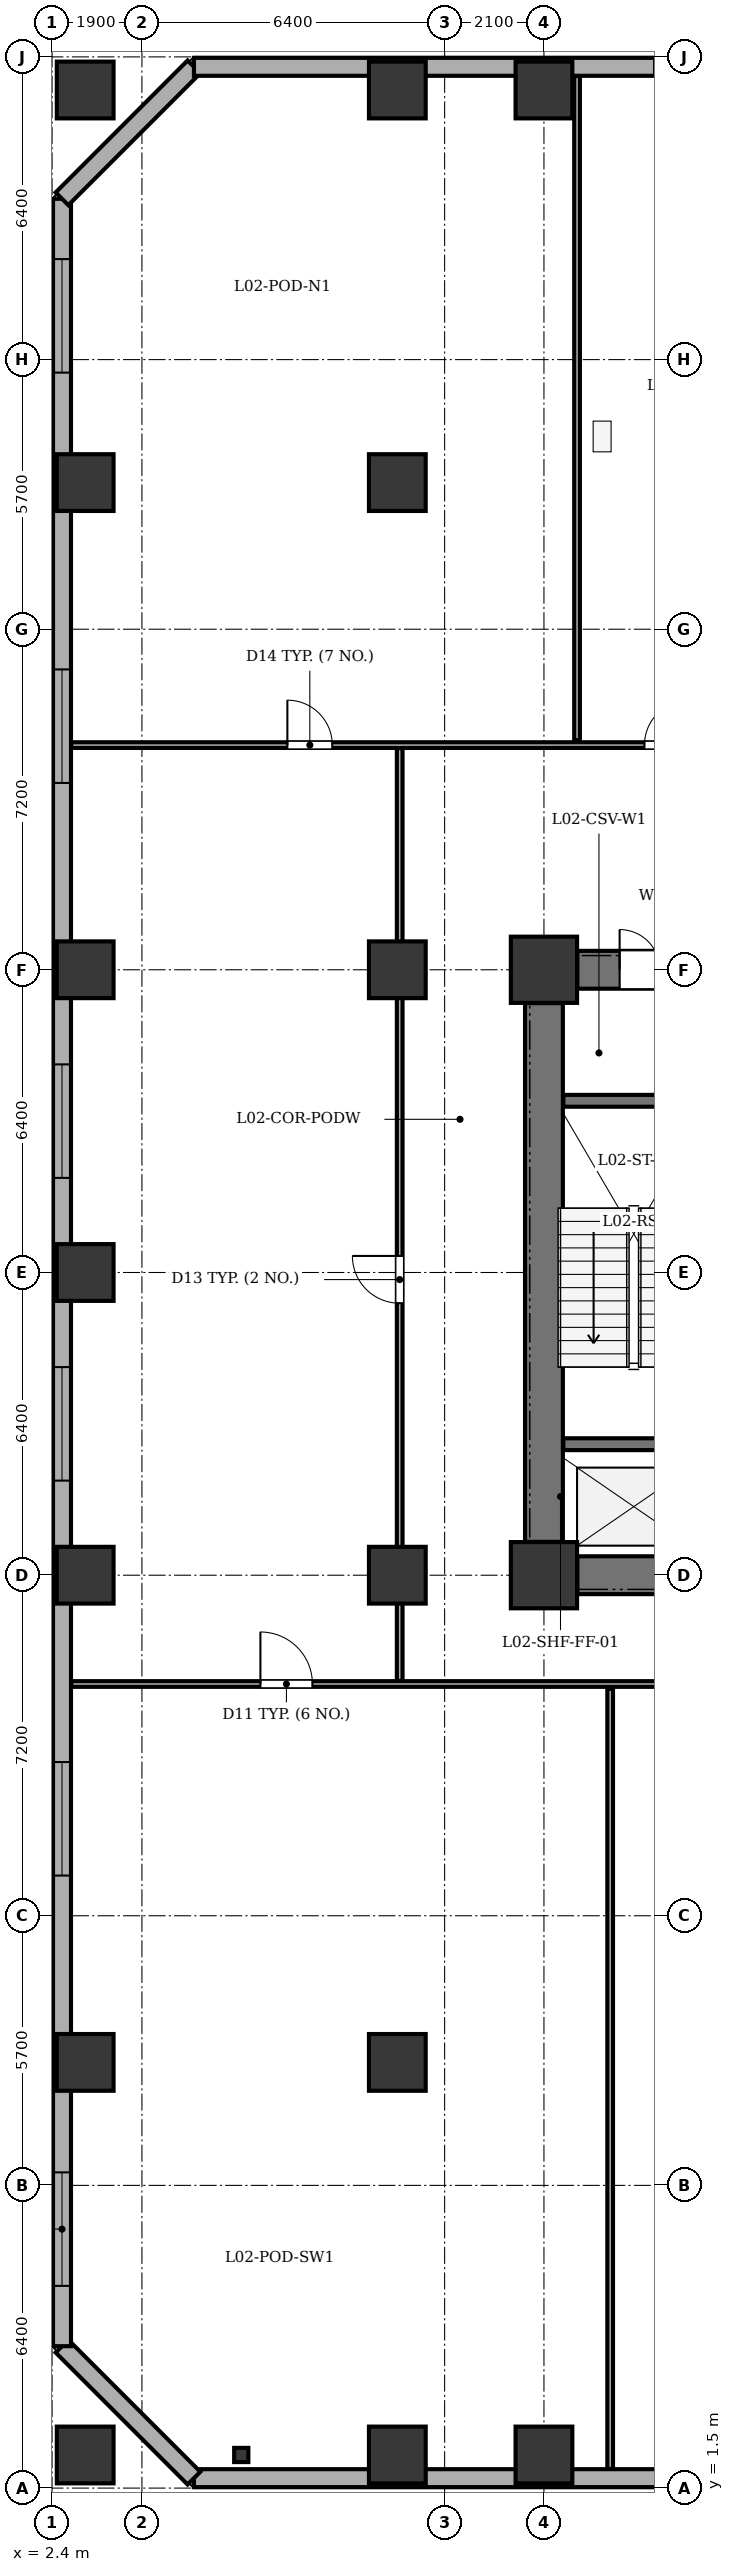
"""IFC4 building model, lengths in metres.
Left out: names, types, materials, properties, quantities, classifications, styles, units other than length and angle.
Written with IfcOpenShell. Run it as: python <this file> out.ifc"""

import sys

from ifc_helpers import new_model, si_unit, direction, frame, frame_2d, origin, origin_2d, place, context, subcontext, project, spatial, rectangle, i_section, extrude, element, fill, save


model = new_model("IFC4")
c1 = context("Model", 3, precision=1e-05, world=origin(), true_north=direction((0.0, 1.0)))
c2 = subcontext(c1, "Body", "Model", "MODEL_VIEW")
j1 = project(units=[si_unit("LENGTHUNIT", "METRE"), si_unit("PLANEANGLEUNIT", "RADIAN")], contexts=[c1])
p1 = place(None, origin())
s1 = spatial("IfcSite", under=j1, at=p1, CompositionType="ELEMENT")
p2 = place(p1, origin())
s2 = spatial("IfcBuilding", under=s1, at=p2, CompositionType="ELEMENT")
p3 = place(p2, frame((0.0, 0.0, 9.9)))
s3 = spatial("IfcBuildingStorey", under=s2, at=p3, CompositionType="ELEMENT", Elevation=9.9)
for number, where, z_axis, x_axis in (
    (1, (12.8, 20.8, 0.0), (0.0, 0.0, 1.0), (1.0, 0.0, 0.0)),
    (2, (12.8, 33.6, 0.0), (0.0, 0.0, 1.0), (1.0, 0.0, 0.0)),
):
    element("IfcColumn", number, at=place(p3, frame(where, z_axis=z_axis, x_axis=x_axis)), inside=s3, PredefinedType="COLUMN", context=c2, shape_type="SweptSolid", body=[
        extrude(rectangle(XDim=1.4, YDim=1.4, at=origin_2d()), origin(), (0.0, 0.0, 1.0), 4.5),
    ])
for number, where, z_axis, x_axis in (
    (3, (3.1, 2.2, 0.0), (0.0, 0.0, 1.0), (1.0, 0.0, 0.0)),
    (4, (3.1, 52.2, 0.0), (0.0, 0.0, 1.0), (1.0, 0.0, 0.0)),
    (5, (9.7, 2.2, 0.0), (0.0, 0.0, 1.0), (1.0, 0.0, 0.0)),
    (6, (9.7, 52.2, 0.0), (0.0, 0.0, 1.0), (1.0, 0.0, 0.0)),
    (7, (12.8, 2.2, 0.0), (0.0, 0.0, 1.0), (1.0, 0.0, 0.0)),
    (8, (12.8, 52.2, 0.0), (0.0, 0.0, 1.0), (1.0, 0.0, 0.0)),
    (9, (3.1, 10.5, 0.0), (0.0, 0.0, 1.0), (1.0, 0.0, 0.0)),
    (10, (3.1, 20.8, 0.0), (0.0, 0.0, 1.0), (1.0, 0.0, 0.0)),
    (11, (3.1, 27.2, 0.0), (0.0, 0.0, 1.0), (1.0, 0.0, 0.0)),
    (12, (3.1, 33.6, 0.0), (0.0, 0.0, 1.0), (1.0, 0.0, 0.0)),
    (13, (3.1, 43.9, 0.0), (0.0, 0.0, 1.0), (1.0, 0.0, 0.0)),
    (14, (9.7, 10.5, 0.0), (0.0, 0.0, 1.0), (1.0, 0.0, 0.0)),
    (15, (9.7, 20.8, 0.0), (0.0, 0.0, 1.0), (1.0, 0.0, 0.0)),
    (16, (9.7, 33.6, 0.0), (0.0, 0.0, 1.0), (1.0, 0.0, 0.0)),
    (17, (9.7, 43.9, 0.0), (0.0, 0.0, 1.0), (1.0, 0.0, 0.0)),
):
    element("IfcColumn", number, at=place(p3, frame(where, z_axis=z_axis, x_axis=x_axis)), inside=s3, PredefinedType="COLUMN", context=c2, shape_type="SweptSolid", body=[
        extrude(rectangle(XDim=1.2, YDim=1.2, at=origin_2d()), origin(), (0.0, 0.0, 1.0), 4.5),
    ])
p4 = place(p3, frame((6.4, 2.2, 0.0), z_axis=(0.0, 0.0, 1.0), x_axis=(1.0, 0.0, 0.0)))
e18 = element("IfcColumn", 18, at=p4, inside=s3, PredefinedType="PILASTER", context=c2, shape_type="SweptSolid", body=[
    extrude(i_section(OverallWidth=0.3, OverallDepth=0.3, WebThickness=0.011, FlangeThickness=0.019, at=origin_2d()), origin(), (0.0, 0.0, 1.0), 4.18),
])
p5 = place(p3, frame((55.0, 1.71, 0.0), z_axis=(0.0, 0.0, 1.0), x_axis=(-1.0, 0.0, 0.0)))
e19 = element("IfcWall", 19, at=p5, inside=s3, PredefinedType="STANDARD", context=c2, shape_type="SweptSolid", body=[
    extrude(rectangle(XDim=49.6, YDim=0.38, at=frame_2d((24.8, 0.0))), origin(), (0.0, 0.0, 1.0), 4.18),
])
p6 = place(p3, frame((5.4, 1.71, 0.0), z_axis=(0.0, 0.0, 1.0), x_axis=(-0.707075841688, 0.707137719332, 0.0)))
e20 = element("IfcWall", 20, at=p6, inside=s3, PredefinedType="STANDARD", context=c2, shape_type="SweptSolid", body=[
    extrude(rectangle(XDim=3.946, YDim=0.38, at=frame_2d((1.973, 0.0))), origin(), (0.0, 0.0, 1.0), 4.18),
])
p7 = place(p3, frame((2.61, 4.5, 0.0), z_axis=(0.0, 0.0, 1.0), x_axis=(0.0, 1.0, 0.0)))
e21 = element("IfcWall", 21, at=p7, inside=s3, PredefinedType="STANDARD", context=c2, shape_type="SweptSolid", body=[
    extrude(rectangle(XDim=45.4, YDim=0.38, at=frame_2d((22.7, 0.0))), origin(), (0.0, 0.0, 1.0), 4.18),
])
p8 = place(p7, frame((1.275, 0.0, 0.75)))
e22 = element("IfcOpeningElement", 22, at=p8, cuts=e21, PredefinedType="OPENING", context=c2, shape_type="SweptSolid", body=[
    extrude(rectangle(XDim=2.4, YDim=2.1, at=frame_2d((1.2, 1.05))), frame((0.0, 0.2, 0.0), z_axis=(0.0, -1.0, 0.0), x_axis=(1.0, 0.0, 0.0)), (0.0, 0.0, 1.0), 0.4),
])
p9 = place(p7, frame((9.95, 0.0, 0.75)))
e23 = element("IfcOpeningElement", 23, at=p9, cuts=e21, PredefinedType="OPENING", context=c2, shape_type="SweptSolid", body=[
    extrude(rectangle(XDim=2.4, YDim=2.1, at=frame_2d((1.2, 1.05))), frame((0.0, 0.2, 0.0), z_axis=(0.0, -1.0, 0.0), x_axis=(1.0, 0.0, 0.0)), (0.0, 0.0, 1.0), 0.4),
])
p10 = place(p7, frame((18.3, 0.0, 0.75)))
e24 = element("IfcOpeningElement", 24, at=p10, cuts=e21, PredefinedType="OPENING", context=c2, shape_type="SweptSolid", body=[
    extrude(rectangle(XDim=2.4, YDim=2.1, at=frame_2d((1.2, 1.05))), frame((0.0, 0.2, 0.0), z_axis=(0.0, -1.0, 0.0), x_axis=(1.0, 0.0, 0.0)), (0.0, 0.0, 1.0), 0.4),
])
p11 = place(p7, frame((24.7, 0.0, 0.75)))
e25 = element("IfcOpeningElement", 25, at=p11, cuts=e21, PredefinedType="OPENING", context=c2, shape_type="SweptSolid", body=[
    extrude(rectangle(XDim=2.4, YDim=2.1, at=frame_2d((1.2, 1.05))), frame((0.0, 0.2, 0.0), z_axis=(0.0, -1.0, 0.0), x_axis=(1.0, 0.0, 0.0)), (0.0, 0.0, 1.0), 0.4),
])
p12 = place(p7, frame((33.05, 0.0, 0.75)))
e26 = element("IfcOpeningElement", 26, at=p12, cuts=e21, PredefinedType="OPENING", context=c2, shape_type="SweptSolid", body=[
    extrude(rectangle(XDim=2.4, YDim=2.1, at=frame_2d((1.2, 1.05))), frame((0.0, 0.2, 0.0), z_axis=(0.0, -1.0, 0.0), x_axis=(1.0, 0.0, 0.0)), (0.0, 0.0, 1.0), 0.4),
])
p13 = place(p7, frame((41.725, 0.0, 0.75)))
e27 = element("IfcOpeningElement", 27, at=p13, cuts=e21, PredefinedType="OPENING", context=c2, shape_type="SweptSolid", body=[
    extrude(rectangle(XDim=2.4, YDim=2.1, at=frame_2d((1.2, 1.05))), frame((0.0, 0.2, 0.0), z_axis=(0.0, -1.0, 0.0), x_axis=(1.0, 0.0, 0.0)), (0.0, 0.0, 1.0), 0.4),
])
p14 = place(p3, frame((2.61, 49.9, 0.0), z_axis=(0.0, 0.0, 1.0), x_axis=(0.707075841688, 0.707137719332, 0.0)))
e28 = element("IfcWall", 28, at=p14, inside=s3, PredefinedType="STANDARD", context=c2, shape_type="SweptSolid", body=[
    extrude(rectangle(XDim=3.946, YDim=0.38, at=frame_2d((1.973, 0.0))), origin(), (0.0, 0.0, 1.0), 4.18),
])
p15 = place(p3, frame((5.4, 52.69, 0.0), z_axis=(0.0, 0.0, 1.0), x_axis=(1.0, 0.0, 0.0)))
e29 = element("IfcWall", 29, at=p15, inside=s3, PredefinedType="STANDARD", context=c2, shape_type="SweptSolid", body=[
    extrude(rectangle(XDim=9.75, YDim=0.38, at=frame_2d((4.875, 0.0))), origin(), (0.0, 0.0, 1.0), 4.18),
])
p16 = place(p3, frame((12.8, 21.505, 0.0), z_axis=(0.0, 0.0, 1.0), x_axis=(0.0, 1.0, 0.0)))
e30 = element("IfcWall", 30, at=p16, inside=s3, PredefinedType="SHEAR", context=c2, shape_type="SweptSolid", body=[
    extrude(rectangle(XDim=11.39, YDim=0.8, at=frame_2d((5.695, 0.0))), origin(), (0.0, 0.0, 1.0), 4.18),
])
p17 = place(p3, frame((13.505, 20.8, 0.0), z_axis=(0.0, 0.0, 1.0), x_axis=(1.0, 0.0, 0.0)))
e31 = element("IfcWall", 31, at=p17, inside=s3, PredefinedType="SHEAR", context=c2, shape_type="SweptSolid", body=[
    extrude(rectangle(XDim=6.59, YDim=0.8, at=frame_2d((3.295, 0.0))), origin(), (0.0, 0.0, 1.0), 4.18),
])
p18 = place(p3, frame((13.505, 33.6, 0.0), z_axis=(0.0, 0.0, 1.0), x_axis=(1.0, 0.0, 0.0)))
e32 = element("IfcWall", 32, at=p18, inside=s3, PredefinedType="SHEAR", context=c2, shape_type="SweptSolid", body=[
    extrude(rectangle(XDim=6.59, YDim=0.8, at=frame_2d((3.295, 0.0))), origin(), (0.0, 0.0, 1.0), 4.18),
])
p19 = place(p18, frame((0.895, 0.0, 0.0)))
e33 = element("IfcOpeningElement", 33, at=p19, cuts=e32, PredefinedType="OPENING", context=c2, shape_type="SweptSolid", body=[
    extrude(rectangle(XDim=0.85, YDim=2.02, at=frame_2d((0.425, 1.01))), frame((0.0, 0.41, 0.0), z_axis=(0.0, -1.0, 0.0), x_axis=(1.0, 0.0, 0.0)), (0.0, 0.0, 1.0), 0.82),
])
for number, where, z_axis, x_axis in (
    (34, (13.21, 23.57, 0.0), (0.0, 0.0, 1.0), (1.0, 0.0, 0.0)),
    (35, (13.21, 30.83, 0.0), (0.0, 0.0, 1.0), (1.0, 0.0, 0.0)),
):
    element("IfcWall", number, at=place(p3, frame(where, z_axis=z_axis, x_axis=x_axis)), inside=s3, PredefinedType="SHEAR", context=c2, shape_type="SweptSolid", body=[
        extrude(rectangle(XDim=3.1, YDim=0.25, at=frame_2d((1.55, 0.0))), origin(), (0.0, 0.0, 1.0), 4.18),
    ])
p20 = place(p3, frame((2.805, 18.5, 0.0), z_axis=(0.0, 0.0, 1.0), x_axis=(1.0, 0.0, 0.0)))
e36 = element("IfcWall", 36, at=p20, inside=s3, PredefinedType="PARTITIONING", context=c2, shape_type="SweptSolid", body=[
    extrude(rectangle(XDim=19.18, YDim=0.12, at=frame_2d((9.59, 0.0))), origin(), (0.0, 0.0, 1.0), 3.665),
])
p21 = place(p20, frame((4.0, 0.0, 0.0)))
e37 = element("IfcOpeningElement", 37, at=p21, cuts=e36, PredefinedType="OPENING", context=c2, shape_type="SweptSolid", body=[
    extrude(rectangle(XDim=1.1, YDim=2.15, at=frame_2d((0.55, 1.075))), frame((0.0, 0.07, 0.0), z_axis=(0.0, -1.0, 0.0), x_axis=(1.0, 0.0, 0.0)), (0.0, 0.0, 1.0), 0.14),
])
p22 = place(p20, frame((14.0, 0.0, 0.0)))
e38 = element("IfcOpeningElement", 38, at=p22, cuts=e36, PredefinedType="OPENING", context=c2, shape_type="SweptSolid", body=[
    extrude(rectangle(XDim=1.1, YDim=2.15, at=frame_2d((0.55, 1.075))), frame((0.0, 0.07, 0.0), z_axis=(0.0, -1.0, 0.0), x_axis=(1.0, 0.0, 0.0)), (0.0, 0.0, 1.0), 0.14),
])
p23 = place(p3, frame((14.2, 1.905, 0.0), z_axis=(0.0, 0.0, 1.0), x_axis=(0.0, 1.0, 0.0)))
e39 = element("IfcWall", 39, at=p23, inside=s3, PredefinedType="PARTITIONING", context=c2, shape_type="SweptSolid", body=[
    extrude(rectangle(XDim=16.495, YDim=0.12, at=frame_2d((8.248, 0.0))), origin(), (0.0, 0.0, 1.0), 4.18),
])
p24 = place(p3, frame((2.805, 38.35, 0.0), z_axis=(0.0, 0.0, 1.0), x_axis=(1.0, 0.0, 0.0)))
e40 = element("IfcWall", 40, at=p24, inside=s3, PredefinedType="PARTITIONING", context=c2, shape_type="SweptSolid", body=[
    extrude(rectangle(XDim=54.79, YDim=0.12, at=frame_2d((27.395, 0.0))), origin(), (0.0, 0.0, 1.0), 4.18),
])
p25 = place(p24, frame((4.57, 0.0, 0.0)))
e41 = element("IfcOpeningElement", 41, at=p25, cuts=e40, PredefinedType="OPENING", context=c2, shape_type="SweptSolid", body=[
    extrude(rectangle(XDim=0.95, YDim=2.1, at=frame_2d((0.475, 1.05))), frame((0.0, 0.07, 0.0), z_axis=(0.0, -1.0, 0.0), x_axis=(1.0, 0.0, 0.0)), (0.0, 0.0, 1.0), 0.14),
])
p26 = place(p24, frame((12.12, 0.0, 0.0)))
e42 = element("IfcOpeningElement", 42, at=p26, cuts=e40, PredefinedType="OPENING", context=c2, shape_type="SweptSolid", body=[
    extrude(rectangle(XDim=0.95, YDim=2.1, at=frame_2d((0.475, 1.05))), frame((0.0, 0.07, 0.0), z_axis=(0.0, -1.0, 0.0), x_axis=(1.0, 0.0, 0.0)), (0.0, 0.0, 1.0), 0.14),
])
p27 = place(p24, frame((17.12, 0.0, 0.0)))
e43 = element("IfcOpeningElement", 43, at=p27, cuts=e40, PredefinedType="OPENING", context=c2, shape_type="SweptSolid", body=[
    extrude(rectangle(XDim=0.95, YDim=2.1, at=frame_2d((0.475, 1.05))), frame((0.0, 0.07, 0.0), z_axis=(0.0, -1.0, 0.0), x_axis=(1.0, 0.0, 0.0)), (0.0, 0.0, 1.0), 0.14),
])
p28 = place(p24, frame((21.87, 0.0, 0.0)))
e44 = element("IfcOpeningElement", 44, at=p28, cuts=e40, PredefinedType="OPENING", context=c2, shape_type="SweptSolid", body=[
    extrude(rectangle(XDim=0.95, YDim=2.1, at=frame_2d((0.475, 1.05))), frame((0.0, 0.07, 0.0), z_axis=(0.0, -1.0, 0.0), x_axis=(1.0, 0.0, 0.0)), (0.0, 0.0, 1.0), 0.14),
])
p29 = place(p24, frame((29.87, 0.0, 0.0)))
e45 = element("IfcOpeningElement", 45, at=p29, cuts=e40, PredefinedType="OPENING", context=c2, shape_type="SweptSolid", body=[
    extrude(rectangle(XDim=0.95, YDim=2.1, at=frame_2d((0.475, 1.05))), frame((0.0, 0.07, 0.0), z_axis=(0.0, -1.0, 0.0), x_axis=(1.0, 0.0, 0.0)), (0.0, 0.0, 1.0), 0.14),
])
p30 = place(p24, frame((40.37, 0.0, 0.0)))
e46 = element("IfcOpeningElement", 46, at=p30, cuts=e40, PredefinedType="OPENING", context=c2, shape_type="SweptSolid", body=[
    extrude(rectangle(XDim=0.95, YDim=2.1, at=frame_2d((0.475, 1.05))), frame((0.0, 0.07, 0.0), z_axis=(0.0, -1.0, 0.0), x_axis=(1.0, 0.0, 0.0)), (0.0, 0.0, 1.0), 0.14),
])
p31 = place(p24, frame((49.12, 0.0, 0.0)))
e47 = element("IfcOpeningElement", 47, at=p31, cuts=e40, PredefinedType="OPENING", context=c2, shape_type="SweptSolid", body=[
    extrude(rectangle(XDim=0.95, YDim=2.1, at=frame_2d((0.475, 1.05))), frame((0.0, 0.07, 0.0), z_axis=(0.0, -1.0, 0.0), x_axis=(1.0, 0.0, 0.0)), (0.0, 0.0, 1.0), 0.14),
])
p32 = place(p3, frame((13.5, 38.45, 0.0), z_axis=(0.0, 0.0, 1.0), x_axis=(0.0, 1.0, 0.0)))
e48 = element("IfcWall", 48, at=p32, inside=s3, PredefinedType="PARTITIONING", context=c2, shape_type="SweptSolid", body=[
    extrude(rectangle(XDim=14.045, YDim=0.12, at=frame_2d((7.022, 0.0))), origin(), (0.0, 0.0, 1.0), 4.18),
])
p33 = place(p3, frame((9.75, 18.565, 0.0), z_axis=(0.0, 0.0, 1.0), x_axis=(0.0, 1.0, 0.0)))
e49 = element("IfcWall", 49, at=p33, inside=s3, PredefinedType="PARTITIONING", context=c2, shape_type="SweptSolid", body=[
    extrude(rectangle(XDim=19.72, YDim=0.12, at=frame_2d((9.86, 0.0))), origin(), (0.0, 0.0, 1.0), 3.065),
])
p34 = place(p33, frame((7.985, 0.0, 0.0)))
e50 = element("IfcOpeningElement", 50, at=p34, cuts=e49, PredefinedType="OPENING", context=c2, shape_type="SweptSolid", body=[
    extrude(rectangle(XDim=1.0, YDim=2.1, at=frame_2d((0.5, 1.05))), frame((0.0, 0.07, 0.0), z_axis=(0.0, -1.0, 0.0), x_axis=(1.0, 0.0, 0.0)), (0.0, 0.0, 1.0), 0.14),
])
p35 = place(p8, origin())
e51 = element("IfcWindow", 51, at=p35, inside=s3, PartitioningType="SINGLE_PANEL", PredefinedType="WINDOW", context=c2, shape_type="SweptSolid", body=[
    extrude(rectangle(XDim=2.4, YDim=2.1, at=frame_2d((1.2, 1.05))), frame((0.0, 0.03, 0.0), z_axis=(0.0, -1.0, 0.0), x_axis=(1.0, 0.0, 0.0)), (0.0, 0.0, 1.0), 0.06),
])
fill(e22, e51)
p36 = place(p9, origin())
e52 = element("IfcWindow", 52, at=p36, inside=s3, PartitioningType="SINGLE_PANEL", PredefinedType="WINDOW", context=c2, shape_type="SweptSolid", body=[
    extrude(rectangle(XDim=2.4, YDim=2.1, at=frame_2d((1.2, 1.05))), frame((0.0, 0.03, 0.0), z_axis=(0.0, -1.0, 0.0), x_axis=(1.0, 0.0, 0.0)), (0.0, 0.0, 1.0), 0.06),
])
fill(e23, e52)
p37 = place(p10, origin())
e53 = element("IfcWindow", 53, at=p37, inside=s3, PartitioningType="SINGLE_PANEL", PredefinedType="WINDOW", context=c2, shape_type="SweptSolid", body=[
    extrude(rectangle(XDim=2.4, YDim=2.1, at=frame_2d((1.2, 1.05))), frame((0.0, 0.03, 0.0), z_axis=(0.0, -1.0, 0.0), x_axis=(1.0, 0.0, 0.0)), (0.0, 0.0, 1.0), 0.06),
])
fill(e24, e53)
p38 = place(p11, origin())
e54 = element("IfcWindow", 54, at=p38, inside=s3, PartitioningType="SINGLE_PANEL", PredefinedType="WINDOW", context=c2, shape_type="SweptSolid", body=[
    extrude(rectangle(XDim=2.4, YDim=2.1, at=frame_2d((1.2, 1.05))), frame((0.0, 0.03, 0.0), z_axis=(0.0, -1.0, 0.0), x_axis=(1.0, 0.0, 0.0)), (0.0, 0.0, 1.0), 0.06),
])
fill(e25, e54)
p39 = place(p12, origin())
e55 = element("IfcWindow", 55, at=p39, inside=s3, PartitioningType="SINGLE_PANEL", PredefinedType="WINDOW", context=c2, shape_type="SweptSolid", body=[
    extrude(rectangle(XDim=2.4, YDim=2.1, at=frame_2d((1.2, 1.05))), frame((0.0, 0.03, 0.0), z_axis=(0.0, -1.0, 0.0), x_axis=(1.0, 0.0, 0.0)), (0.0, 0.0, 1.0), 0.06),
])
fill(e26, e55)
p40 = place(p13, origin())
e56 = element("IfcWindow", 56, at=p40, inside=s3, PartitioningType="SINGLE_PANEL", PredefinedType="WINDOW", context=c2, shape_type="SweptSolid", body=[
    extrude(rectangle(XDim=2.4, YDim=2.1, at=frame_2d((1.2, 1.05))), frame((0.0, 0.03, 0.0), z_axis=(0.0, -1.0, 0.0), x_axis=(1.0, 0.0, 0.0)), (0.0, 0.0, 1.0), 0.06),
])
fill(e27, e56)
p41 = place(p19, origin())
e57 = element("IfcDoor", 57, at=p41, inside=s3, OperationType="SINGLE_SWING_LEFT", PredefinedType="DOOR", context=c2, shape_type="SweptSolid", body=[
    extrude(rectangle(XDim=0.85, YDim=2.02, at=frame_2d((0.425, 1.01))), frame((0.0, 0.025, 0.0), z_axis=(0.0, -1.0, 0.0), x_axis=(1.0, 0.0, 0.0)), (0.0, 0.0, 1.0), 0.05),
])
fill(e33, e57)
p42 = place(p21, origin())
e58 = element("IfcDoor", 58, at=p42, inside=s3, OperationType="SINGLE_SWING_LEFT", PredefinedType="DOOR", context=c2, shape_type="SweptSolid", body=[
    extrude(rectangle(XDim=1.1, YDim=2.15, at=frame_2d((0.55, 1.075))), frame((0.0, 0.025, 0.0), z_axis=(0.0, -1.0, 0.0), x_axis=(1.0, 0.0, 0.0)), (0.0, 0.0, 1.0), 0.05),
])
fill(e37, e58)
p43 = place(p25, origin())
e59 = element("IfcDoor", 59, at=p43, inside=s3, OperationType="SINGLE_SWING_LEFT", PredefinedType="DOOR", context=c2, shape_type="SweptSolid", body=[
    extrude(rectangle(XDim=0.95, YDim=2.1, at=frame_2d((0.475, 1.05))), frame((0.0, 0.025, 0.0), z_axis=(0.0, -1.0, 0.0), x_axis=(1.0, 0.0, 0.0)), (0.0, 0.0, 1.0), 0.05),
])
fill(e41, e59)
p44 = place(p26, origin())
e60 = element("IfcDoor", 60, at=p44, inside=s3, OperationType="SINGLE_SWING_RIGHT", PredefinedType="DOOR", context=c2, shape_type="SweptSolid", body=[
    extrude(rectangle(XDim=0.95, YDim=2.1, at=frame_2d((0.475, 1.05))), frame((0.0, 0.025, 0.0), z_axis=(0.0, -1.0, 0.0), x_axis=(1.0, 0.0, 0.0)), (0.0, 0.0, 1.0), 0.05),
])
fill(e42, e60)
p45 = place(p34, origin())
e61 = element("IfcDoor", 61, at=p45, inside=s3, OperationType="SINGLE_SWING_RIGHT", PredefinedType="DOOR", context=c2, shape_type="SweptSolid", body=[
    extrude(rectangle(XDim=1.0, YDim=2.1, at=frame_2d((0.5, 1.05))), frame((0.0, 0.025, 0.0), z_axis=(0.0, -1.0, 0.0), x_axis=(1.0, 0.0, 0.0)), (0.0, 0.0, 1.0), 0.05),
])
fill(e50, e61)
save(model, sys.argv[1])
